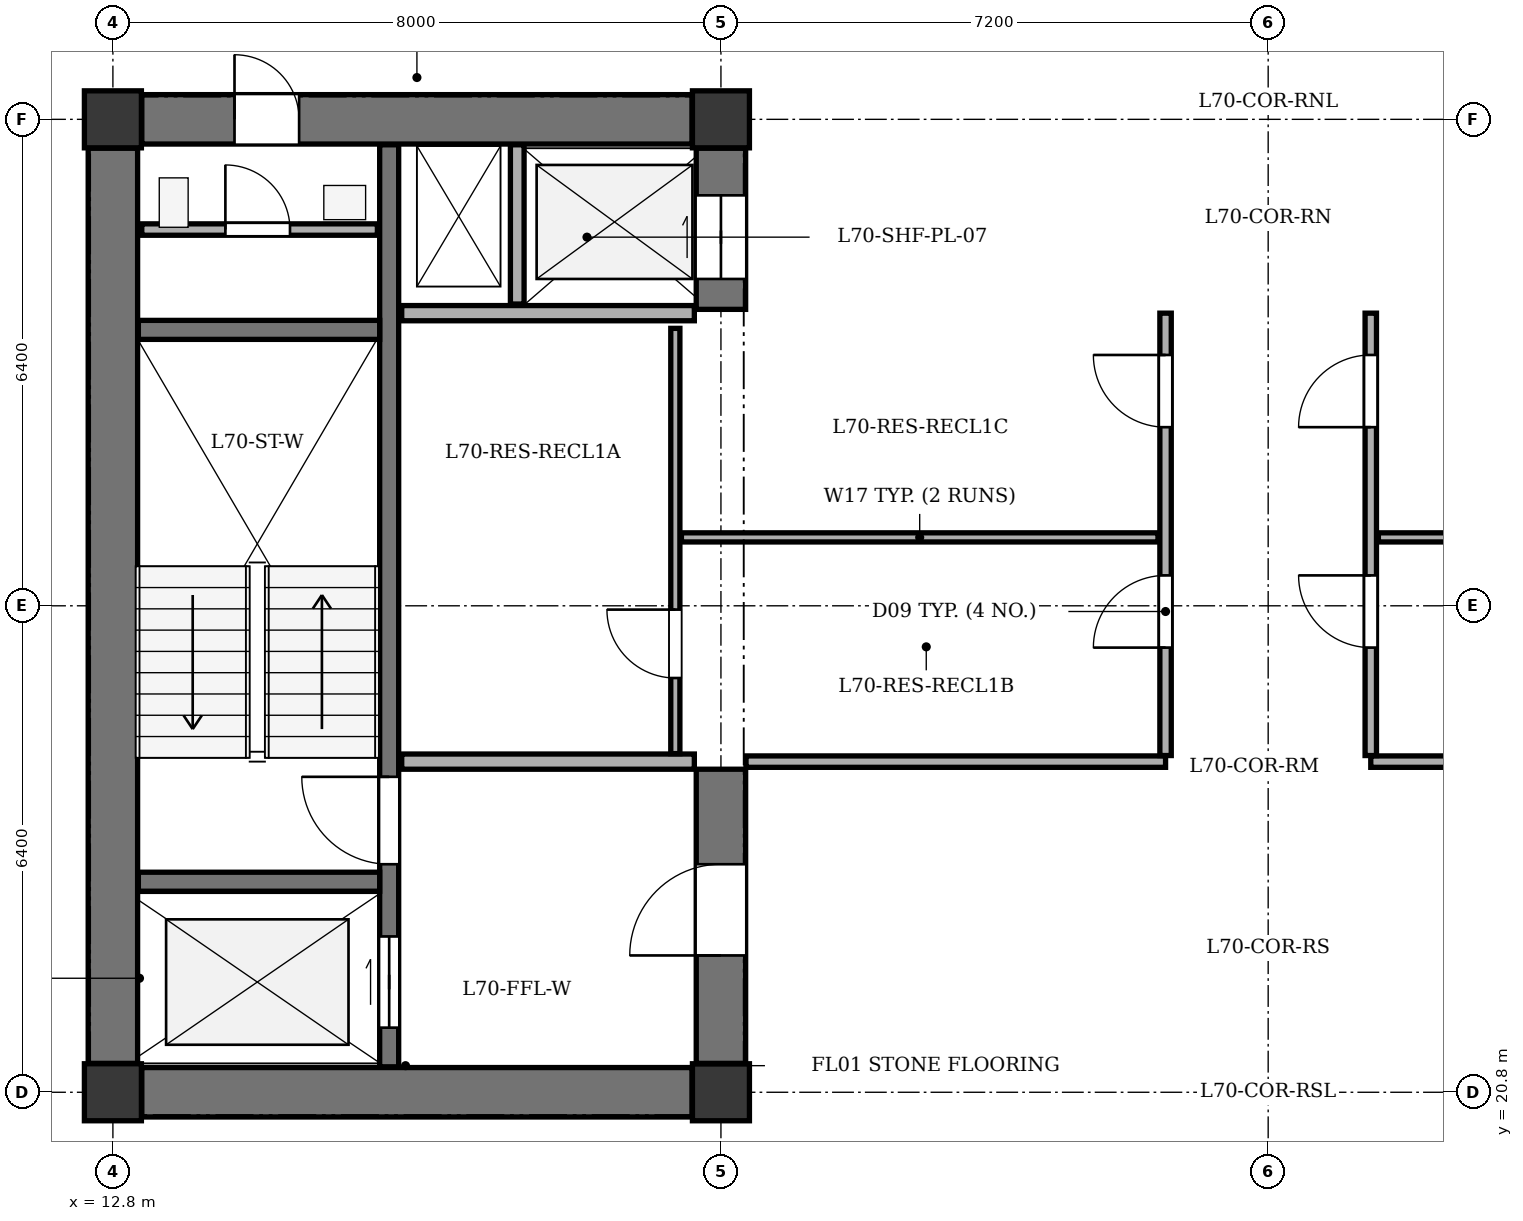
"""IFC4 building model, lengths in metres.
Left out: names, types, materials, properties, quantities, classifications, styles, units other than length and angle.
Written with IfcOpenShell. Run it as: python <this file> out.ifc"""

import sys

from ifc_helpers import new_model, si_unit, direction, frame, frame_2d, origin, origin_2d, place, context, subcontext, project, spatial, rectangle, extrude, element, fill, save


model = new_model("IFC4")
c1 = context("Model", 3, precision=1e-05, world=origin(), true_north=direction((0.0, 1.0)))
c2 = subcontext(c1, "Body", "Model", "MODEL_VIEW")
j1 = project(units=[si_unit("LENGTHUNIT", "METRE"), si_unit("PLANEANGLEUNIT", "RADIAN")], contexts=[c1])
p1 = place(None, origin())
s1 = spatial("IfcSite", under=j1, at=p1, CompositionType="ELEMENT")
p2 = place(p1, origin())
s2 = spatial("IfcBuilding", under=s1, at=p2, CompositionType="ELEMENT")
p3 = place(p2, frame((0.0, 0.0, 265.3)))
s3 = spatial("IfcBuildingStorey", under=s2, at=p3, CompositionType="ELEMENT", Elevation=265.3)
for number, where, z_axis, x_axis in (
    (1, (12.8, 20.8, 0.0), (0.0, 0.0, 1.0), (1.0, 0.0, 0.0)),
    (2, (20.8, 20.8, 0.0), (0.0, 0.0, 1.0), (1.0, 0.0, 0.0)),
    (3, (12.8, 33.6, 0.0), (0.0, 0.0, 1.0), (1.0, 0.0, 0.0)),
    (4, (20.8, 33.6, 0.0), (0.0, 0.0, 1.0), (1.0, 0.0, 0.0)),
):
    element("IfcColumn", number, at=place(p3, frame(where, z_axis=z_axis, x_axis=x_axis)), inside=s3, PredefinedType="COLUMN", context=c2, shape_type="SweptSolid", body=[
        extrude(rectangle(XDim=0.75, YDim=0.75, at=origin_2d()), origin(), (0.0, 0.0, 1.0), 3.4),
    ])
p4 = place(p3, frame((12.8, 21.18, 0.0), z_axis=(0.0, 0.0, 1.0), x_axis=(0.0, 1.0, 0.0)))
e5 = element("IfcWall", 5, at=p4, inside=s3, PredefinedType="SHEAR", context=c2, shape_type="SweptSolid", body=[
    extrude(rectangle(XDim=12.04, YDim=0.65, at=frame_2d((6.02, 0.0))), origin(), (0.0, 0.0, 1.0), 2.95),
])
p5 = place(p3, frame((13.18, 20.8, 0.0), z_axis=(0.0, 0.0, 1.0), x_axis=(1.0, 0.0, 0.0)))
e6 = element("IfcWall", 6, at=p5, inside=s3, PredefinedType="SHEAR", context=c2, shape_type="SweptSolid", body=[
    extrude(rectangle(XDim=7.24, YDim=0.65, at=frame_2d((3.62, 0.0))), origin(), (0.0, 0.0, 1.0), 2.95),
])
p6 = place(p3, frame((13.18, 33.6, 0.0), z_axis=(0.0, 0.0, 1.0), x_axis=(1.0, 0.0, 0.0)))
e7 = element("IfcWall", 7, at=p6, inside=s3, PredefinedType="SHEAR", context=c2, shape_type="SweptSolid", body=[
    extrude(rectangle(XDim=7.24, YDim=0.65, at=frame_2d((3.62, 0.0))), origin(), (0.0, 0.0, 1.0), 2.95),
])
p7 = place(p6, frame((1.22, 0.0, 0.0)))
e8 = element("IfcOpeningElement", 8, at=p7, cuts=e7, PredefinedType="OPENING", context=c2, shape_type="SweptSolid", body=[
    extrude(rectangle(XDim=0.85, YDim=2.02, at=frame_2d((0.425, 1.01))), frame((0.0, 0.335, 0.0), z_axis=(0.0, -1.0, 0.0), x_axis=(1.0, 0.0, 0.0)), (0.0, 0.0, 1.0), 0.67),
])
p8 = place(p3, frame((20.8, 21.18, 0.0), z_axis=(0.0, 0.0, 1.0), x_axis=(0.0, 1.0, 0.0)))
e9 = element("IfcWall", 9, at=p8, inside=s3, PredefinedType="SHEAR", context=c2, shape_type="SweptSolid", body=[
    extrude(rectangle(XDim=3.87, YDim=0.65, at=frame_2d((1.935, 0.0))), origin(), (0.0, 0.0, 1.0), 2.95),
])
p9 = place(p8, frame((1.42, 0.0, 0.0)))
e10 = element("IfcOpeningElement", 10, at=p9, cuts=e9, PredefinedType="OPENING", context=c2, shape_type="SweptSolid", body=[
    extrude(rectangle(XDim=1.2, YDim=2.15, at=frame_2d((0.6, 1.075))), frame((0.0, 0.335, 0.0), z_axis=(0.0, -1.0, 0.0), x_axis=(1.0, 0.0, 0.0)), (0.0, 0.0, 1.0), 0.67),
])
p10 = place(p3, frame((20.8, 31.1, 0.0), z_axis=(0.0, 0.0, 1.0), x_axis=(0.0, 1.0, 0.0)))
e11 = element("IfcWall", 11, at=p10, inside=s3, PredefinedType="SHEAR", context=c2, shape_type="SweptSolid", body=[
    extrude(rectangle(XDim=2.12, YDim=0.65, at=frame_2d((1.06, 0.0))), origin(), (0.0, 0.0, 1.0), 2.95),
])
p11 = place(p10, frame((0.4, 0.0, 0.0)))
e12 = element("IfcOpeningElement", 12, at=p11, cuts=e11, PredefinedType="OPENING", context=c2, shape_type="SweptSolid", body=[
    extrude(rectangle(XDim=1.1, YDim=2.1, at=frame_2d((0.55, 1.05))), frame((0.0, 0.335, 0.0), z_axis=(0.0, -1.0, 0.0), x_axis=(1.0, 0.0, 0.0)), (0.0, 0.0, 1.0), 0.67),
])
p12 = place(p3, frame((16.435, 21.135, 0.0), z_axis=(0.0, 0.0, 1.0), x_axis=(0.0, 1.0, 0.0)))
e13 = element("IfcWall", 13, at=p12, inside=s3, PredefinedType="SHEAR", context=c2, shape_type="SweptSolid", body=[
    extrude(rectangle(XDim=12.13, YDim=0.25, at=frame_2d((6.065, 0.0))), origin(), (0.0, 0.0, 1.0), 2.95),
])
p13 = place(p12, frame((0.515, 0.0, 0.0)))
e14 = element("IfcOpeningElement", 14, at=p13, cuts=e13, PredefinedType="OPENING", context=c2, shape_type="SweptSolid", body=[
    extrude(rectangle(XDim=1.2, YDim=2.15, at=frame_2d((0.6, 1.075))), frame((0.0, 0.135, 0.0), z_axis=(0.0, -1.0, 0.0), x_axis=(1.0, 0.0, 0.0)), (0.0, 0.0, 1.0), 0.27),
])
p14 = place(p12, frame((2.665, 0.0, 0.0)))
e15 = element("IfcOpeningElement", 15, at=p14, cuts=e13, PredefinedType="OPENING", context=c2, shape_type="SweptSolid", body=[
    extrude(rectangle(XDim=1.15, YDim=2.15, at=frame_2d((0.575, 1.075))), frame((0.0, 0.135, 0.0), z_axis=(0.0, -1.0, 0.0), x_axis=(1.0, 0.0, 0.0)), (0.0, 0.0, 1.0), 0.27),
])
for number, where, z_axis, x_axis in (
    (16, (13.135, 23.57, 0.0), (0.0, 0.0, 1.0), (1.0, 0.0, 0.0)),
    (17, (13.135, 30.83, 0.0), (0.0, 0.0, 1.0), (1.0, 0.0, 0.0)),
):
    element("IfcWall", number, at=place(p3, frame(where, z_axis=z_axis, x_axis=x_axis)), inside=s3, PredefinedType="SHEAR", context=c2, shape_type="SweptSolid", body=[
        extrude(rectangle(XDim=3.175, YDim=0.25, at=frame_2d((1.587, 0.0))), origin(), (0.0, 0.0, 1.0), 2.95),
    ])
for number, where, z_axis, x_axis in (
    (18, (16.6, 25.15, 0.0), (0.0, 0.0, 1.0), (1.0, 0.0, 0.0)),
    (19, (16.6, 31.05, 0.0), (0.0, 0.0, 1.0), (1.0, 0.0, 0.0)),
):
    element("IfcWall", number, at=place(p3, frame(where, z_axis=z_axis, x_axis=x_axis)), inside=s3, PredefinedType="SOLIDWALL", context=c2, shape_type="SweptSolid", body=[
        extrude(rectangle(XDim=3.85, YDim=0.2, at=frame_2d((1.925, 0.0))), origin(), (0.0, 0.0, 1.0), 2.95),
    ])
p15 = place(p3, frame((18.12, 31.17, 0.0), z_axis=(0.0, 0.0, 1.0), x_axis=(0.0, 1.0, 0.0)))
e20 = element("IfcWall", 20, at=p15, inside=s3, PredefinedType="PARTITIONING", context=c2, shape_type="SweptSolid", body=[
    extrude(rectangle(XDim=2.095, YDim=0.18, at=frame_2d((1.047, 0.0))), origin(), (0.0, 0.0, 1.0), 2.95),
])
p16 = place(p3, frame((13.18, 32.15, 0.0), z_axis=(0.0, 0.0, 1.0), x_axis=(1.0, 0.0, 0.0)))
e21 = element("IfcWall", 21, at=p16, inside=s3, PredefinedType="PARTITIONING", context=c2, shape_type="SweptSolid", body=[
    extrude(rectangle(XDim=3.1, YDim=0.15, at=frame_2d((1.55, 0.0))), origin(), (0.0, 0.0, 1.0), 2.95),
])
p17 = place(p16, frame((1.1, 0.0, 0.0)))
e22 = element("IfcOpeningElement", 22, at=p17, cuts=e21, PredefinedType="OPENING", context=c2, shape_type="SweptSolid", body=[
    extrude(rectangle(XDim=0.85, YDim=2.02, at=frame_2d((0.425, 1.01))), frame((0.0, 0.085, 0.0), z_axis=(0.0, -1.0, 0.0), x_axis=(1.0, 0.0, 0.0)), (0.0, 0.0, 1.0), 0.17),
])
for number, where, z_axis, x_axis in (
    (23, (21.13, 25.15, 0.0), (0.0, 0.0, 1.0), (1.0, 0.0, 0.0)),
    (24, (29.35, 25.15, 0.0), (0.0, 0.0, 1.0), (1.0, 0.0, 0.0)),
):
    element("IfcWall", number, at=place(p3, frame(where, z_axis=z_axis, x_axis=x_axis)), inside=s3, PredefinedType="PARTITIONING", context=c2, shape_type="SweptSolid", body=[
        extrude(rectangle(XDim=5.52, YDim=0.15, at=frame_2d((2.76, 0.0))), origin(), (0.0, 0.0, 1.0), 2.95),
    ])
p18 = place(p3, frame((26.65, 25.23, 0.0), z_axis=(0.0, 0.0, 1.0), x_axis=(0.0, 1.0, 0.0)))
e25 = element("IfcWall", 25, at=p18, inside=s3, PredefinedType="PARTITIONING", context=c2, shape_type="SweptSolid", body=[
    extrude(rectangle(XDim=5.82, YDim=0.15, at=frame_2d((2.91, 0.0))), origin(), (0.0, 0.0, 1.0), 2.95),
])
p19 = place(p18, frame((1.42, 0.0, 0.0)))
e26 = element("IfcOpeningElement", 26, at=p19, cuts=e25, PredefinedType="OPENING", context=c2, shape_type="SweptSolid", body=[
    extrude(rectangle(XDim=0.95, YDim=2.1, at=frame_2d((0.475, 1.05))), frame((0.0, 0.085, 0.0), z_axis=(0.0, -1.0, 0.0), x_axis=(1.0, 0.0, 0.0)), (0.0, 0.0, 1.0), 0.17),
])
p20 = place(p18, frame((4.32, 0.0, 0.0)))
e27 = element("IfcOpeningElement", 27, at=p20, cuts=e25, PredefinedType="OPENING", context=c2, shape_type="SweptSolid", body=[
    extrude(rectangle(XDim=0.95, YDim=2.1, at=frame_2d((0.475, 1.05))), frame((0.0, 0.085, 0.0), z_axis=(0.0, -1.0, 0.0), x_axis=(1.0, 0.0, 0.0)), (0.0, 0.0, 1.0), 0.17),
])
p21 = place(p3, frame((20.2, 25.255, 0.0), z_axis=(0.0, 0.0, 1.0), x_axis=(0.0, 1.0, 0.0)))
e28 = element("IfcWall", 28, at=p21, inside=s3, PredefinedType="PARTITIONING", context=c2, shape_type="SweptSolid", body=[
    extrude(rectangle(XDim=5.595, YDim=0.12, at=frame_2d((2.798, 0.0))), origin(), (0.0, 0.0, 1.0), 2.95),
])
p22 = place(p21, frame((0.995, 0.0, 0.0)))
e29 = element("IfcOpeningElement", 29, at=p22, cuts=e28, PredefinedType="OPENING", context=c2, shape_type="SweptSolid", body=[
    extrude(rectangle(XDim=0.9, YDim=2.05, at=frame_2d((0.45, 1.025))), frame((0.0, 0.07, 0.0), z_axis=(0.0, -1.0, 0.0), x_axis=(1.0, 0.0, 0.0)), (0.0, 0.0, 1.0), 0.14),
])
p23 = place(p3, frame((20.28, 28.1, 0.0), z_axis=(0.0, 0.0, 1.0), x_axis=(1.0, 0.0, 0.0)))
e30 = element("IfcWall", 30, at=p23, inside=s3, PredefinedType="PARTITIONING", context=c2, shape_type="SweptSolid", body=[
    extrude(rectangle(XDim=6.27, YDim=0.12, at=frame_2d((3.135, 0.0))), origin(), (0.0, 0.0, 1.0), 2.95),
])
p24 = place(p3, frame((29.35, 25.23, 0.0), z_axis=(0.0, 0.0, 1.0), x_axis=(0.0, 1.0, 0.0)))
e31 = element("IfcWall", 31, at=p24, inside=s3, PredefinedType="PARTITIONING", context=c2, shape_type="SweptSolid", body=[
    extrude(rectangle(XDim=5.82, YDim=0.15, at=frame_2d((2.91, 0.0))), origin(), (0.0, 0.0, 1.0), 2.95),
])
p25 = place(p24, frame((1.42, 0.0, 0.0)))
e32 = element("IfcOpeningElement", 32, at=p25, cuts=e31, PredefinedType="OPENING", context=c2, shape_type="SweptSolid", body=[
    extrude(rectangle(XDim=0.95, YDim=2.1, at=frame_2d((0.475, 1.05))), frame((0.0, 0.085, 0.0), z_axis=(0.0, -1.0, 0.0), x_axis=(1.0, 0.0, 0.0)), (0.0, 0.0, 1.0), 0.17),
])
p26 = place(p24, frame((4.32, 0.0, 0.0)))
e33 = element("IfcOpeningElement", 33, at=p26, cuts=e31, PredefinedType="OPENING", context=c2, shape_type="SweptSolid", body=[
    extrude(rectangle(XDim=0.95, YDim=2.1, at=frame_2d((0.475, 1.05))), frame((0.0, 0.085, 0.0), z_axis=(0.0, -1.0, 0.0), x_axis=(1.0, 0.0, 0.0)), (0.0, 0.0, 1.0), 0.17),
])
p27 = place(p3, frame((29.45, 28.1, 0.0), z_axis=(0.0, 0.0, 1.0), x_axis=(1.0, 0.0, 0.0)))
e34 = element("IfcWall", 34, at=p27, inside=s3, PredefinedType="PARTITIONING", context=c2, shape_type="SweptSolid", body=[
    extrude(rectangle(XDim=5.27, YDim=0.12, at=frame_2d((2.635, 0.0))), origin(), (0.0, 0.0, 1.0), 2.95),
])
p28 = place(p7, origin())
e35 = element("IfcDoor", 35, at=p28, inside=s3, OperationType="SINGLE_SWING_LEFT", PredefinedType="DOOR", context=c2, shape_type="SweptSolid", body=[
    extrude(rectangle(XDim=0.85, YDim=2.02, at=frame_2d((0.425, 1.01))), frame((0.0, 0.025, 0.0), z_axis=(0.0, -1.0, 0.0), x_axis=(1.0, 0.0, 0.0)), (0.0, 0.0, 1.0), 0.05),
])
fill(e8, e35)
p29 = place(p9, origin())
e36 = element("IfcDoor", 36, at=p29, inside=s3, OperationType="SINGLE_SWING_LEFT", PredefinedType="DOOR", context=c2, shape_type="SweptSolid", body=[
    extrude(rectangle(XDim=1.2, YDim=2.15, at=frame_2d((0.6, 1.075))), frame((0.0, 0.025, 0.0), z_axis=(0.0, -1.0, 0.0), x_axis=(1.0, 0.0, 0.0)), (0.0, 0.0, 1.0), 0.05),
])
fill(e10, e36)
p30 = place(p11, origin())
e37 = element("IfcDoor", 37, at=p30, inside=s3, OperationType="DOUBLE_DOOR_SLIDING", PredefinedType="DOOR", context=c2, shape_type="SweptSolid", body=[
    extrude(rectangle(XDim=1.1, YDim=2.1, at=frame_2d((0.55, 1.05))), frame((0.0, 0.025, 0.0), z_axis=(0.0, -1.0, 0.0), x_axis=(1.0, 0.0, 0.0)), (0.0, 0.0, 1.0), 0.05),
])
fill(e12, e37)
p31 = place(p13, origin())
e38 = element("IfcDoor", 38, at=p31, inside=s3, OperationType="DOUBLE_DOOR_SLIDING", PredefinedType="DOOR", context=c2, shape_type="SweptSolid", body=[
    extrude(rectangle(XDim=1.2, YDim=2.15, at=frame_2d((0.6, 1.075))), frame((0.0, 0.025, 0.0), z_axis=(0.0, -1.0, 0.0), x_axis=(1.0, 0.0, 0.0)), (0.0, 0.0, 1.0), 0.05),
])
fill(e14, e38)
p32 = place(p14, origin())
e39 = element("IfcDoor", 39, at=p32, inside=s3, OperationType="SINGLE_SWING_RIGHT", PredefinedType="DOOR", context=c2, shape_type="SweptSolid", body=[
    extrude(rectangle(XDim=1.15, YDim=2.15, at=frame_2d((0.575, 1.075))), frame((0.0, 0.025, 0.0), z_axis=(0.0, -1.0, 0.0), x_axis=(1.0, 0.0, 0.0)), (0.0, 0.0, 1.0), 0.05),
])
fill(e15, e39)
p33 = place(p17, origin())
e40 = element("IfcDoor", 40, at=p33, inside=s3, OperationType="SINGLE_SWING_LEFT", PredefinedType="DOOR", context=c2, shape_type="SweptSolid", body=[
    extrude(rectangle(XDim=0.85, YDim=2.02, at=frame_2d((0.425, 1.01))), frame((0.0, 0.025, 0.0), z_axis=(0.0, -1.0, 0.0), x_axis=(1.0, 0.0, 0.0)), (0.0, 0.0, 1.0), 0.05),
])
fill(e22, e40)
p34 = place(p22, origin())
e41 = element("IfcDoor", 41, at=p34, inside=s3, OperationType="SINGLE_SWING_RIGHT", PredefinedType="DOOR", context=c2, shape_type="SweptSolid", body=[
    extrude(rectangle(XDim=0.9, YDim=2.05, at=frame_2d((0.45, 1.025))), frame((0.0, 0.025, 0.0), z_axis=(0.0, -1.0, 0.0), x_axis=(1.0, 0.0, 0.0)), (0.0, 0.0, 1.0), 0.05),
])
fill(e29, e41)
p35 = place(p19, origin())
e42 = element("IfcDoor", 42, at=p35, inside=s3, OperationType="SINGLE_SWING_LEFT", PredefinedType="DOOR", context=c2, shape_type="SweptSolid", body=[
    extrude(rectangle(XDim=0.95, YDim=2.1, at=frame_2d((0.475, 1.05))), frame((0.0, 0.025, 0.0), z_axis=(0.0, -1.0, 0.0), x_axis=(1.0, 0.0, 0.0)), (0.0, 0.0, 1.0), 0.05),
])
fill(e26, e42)
p36 = place(p20, origin())
e43 = element("IfcDoor", 43, at=p36, inside=s3, OperationType="SINGLE_SWING_RIGHT", PredefinedType="DOOR", context=c2, shape_type="SweptSolid", body=[
    extrude(rectangle(XDim=0.95, YDim=2.1, at=frame_2d((0.475, 1.05))), frame((0.0, 0.025, 0.0), z_axis=(0.0, -1.0, 0.0), x_axis=(1.0, 0.0, 0.0)), (0.0, 0.0, 1.0), 0.05),
])
fill(e27, e43)
p37 = place(p25, origin())
e44 = element("IfcDoor", 44, at=p37, inside=s3, OperationType="SINGLE_SWING_RIGHT", PredefinedType="DOOR", context=c2, shape_type="SweptSolid", body=[
    extrude(rectangle(XDim=0.95, YDim=2.1, at=frame_2d((0.475, 1.05))), frame((0.0, 0.025, 0.0), z_axis=(0.0, -1.0, 0.0), x_axis=(1.0, 0.0, 0.0)), (0.0, 0.0, 1.0), 0.05),
])
fill(e32, e44)
p38 = place(p26, origin())
e45 = element("IfcDoor", 45, at=p38, inside=s3, OperationType="SINGLE_SWING_LEFT", PredefinedType="DOOR", context=c2, shape_type="SweptSolid", body=[
    extrude(rectangle(XDim=0.95, YDim=2.1, at=frame_2d((0.475, 1.05))), frame((0.0, 0.025, 0.0), z_axis=(0.0, -1.0, 0.0), x_axis=(1.0, 0.0, 0.0)), (0.0, 0.0, 1.0), 0.05),
])
fill(e33, e45)
save(model, sys.argv[1])
